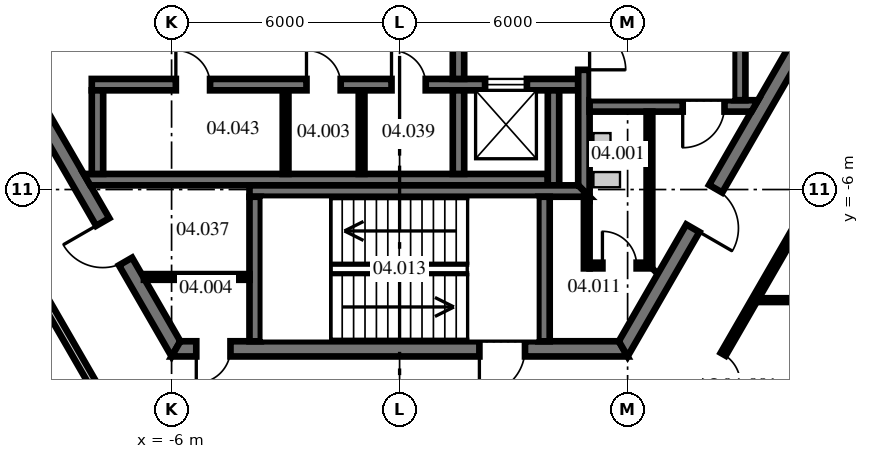
"""IFC4 building model, lengths in metres.
Left out: names, types, materials, properties, quantities, classifications, styles, units other than length and angle.
Written with IfcOpenShell. Run it as: python <this file> out.ifc"""

import sys

from ifc_helpers import new_model, si_unit, direction, frame, frame_2d, origin, place, context, subcontext, project, spatial, polyline, rectangle, outline, extrude, source, transform, mapped, element, fill, save


model = new_model("IFC4")
c1 = context("Model", 3, precision=1e-05, world=origin(), true_north=direction((0.0, 1.0)))
c2 = subcontext(c1, "Body", "Model", "MODEL_VIEW")
j1 = project(units=[si_unit("LENGTHUNIT", "METRE"), si_unit("PLANEANGLEUNIT", "RADIAN")], contexts=[c1])
p1 = place(None, origin())
s1 = spatial("IfcSite", under=j1, at=p1, CompositionType="ELEMENT")
p2 = place(p1, origin())
s2 = spatial("IfcBuilding", under=s1, at=p2, CompositionType="ELEMENT")
p3 = place(p2, frame((0.0, 0.0, 20.3)))
s3 = spatial("IfcBuildingStorey", under=s2, at=p3, CompositionType="ELEMENT", Elevation=20.3)
m1 = source(origin(), c2, "Body", "SweptSolid", [
    extrude(outline(polyline([(-0.115, -0.2), (11.885, -0.2), (11.654, 0.2), (0.115, 0.2), (-0.115, -0.2)])), origin(), (0.0, 0.0, 1.0), 4.1),
])
p4 = place(p3, frame((-11.769, 0.0, 0.0), z_axis=(0.0, 0.0, 1.0), x_axis=(0.499996592174, -0.866027371285, 0.0)))
e1 = element("IfcWall", 1, at=p4, inside=s3, PredefinedType="SHEAR", context=c2, shape_type="MappedRepresentation", body=[
    mapped(m1, transform((0.0, 0.0, 0.0), scale=1.0)),
])
p5 = place(p4, frame((1.405, 0.0, 0.0)))
e2 = element("IfcOpeningElement", 2, at=p5, cuts=e1, PredefinedType="OPENING", context=c2, shape_type="SweptSolid", body=[
    extrude(rectangle(XDim=1.8, YDim=2.1, at=frame_2d((0.9, 1.05))), frame((0.0, 0.21, 0.0), z_axis=(0.0, -1.0, 0.0), x_axis=(1.0, 0.0, 0.0)), (0.0, 0.0, 1.0), 0.42),
])
p6 = place(p4, frame((7.915, 0.0, 0.0)))
e3 = element("IfcOpeningElement", 3, at=p6, cuts=e1, PredefinedType="OPENING", context=c2, shape_type="SweptSolid", body=[
    extrude(rectangle(XDim=1.2, YDim=2.1, at=frame_2d((0.6, 1.05))), frame((0.0, 0.21, 0.0), z_axis=(0.0, -1.0, 0.0), x_axis=(1.0, 0.0, 0.0)), (0.0, 0.0, 1.0), 0.42),
])
p7 = place(p3, frame((-5.885, -10.192, 0.0), z_axis=(0.0, 0.0, 1.0), x_axis=(1.0, 0.0, 0.0)))
e4 = element("IfcWall", 4, at=p7, inside=s3, PredefinedType="SHEAR", context=c2, shape_type="MappedRepresentation", body=[
    mapped(m1, transform((0.0, 0.0, 0.0), scale=1.0)),
])
p8 = place(p7, frame((7.985, 0.0, 0.0)))
e5 = element("IfcOpeningElement", 5, at=p8, cuts=e4, PredefinedType="OPENING", context=c2, shape_type="SweptSolid", body=[
    extrude(rectangle(XDim=1.2, YDim=2.1, at=frame_2d((0.6, 1.05))), frame((0.0, 0.21, 0.0), z_axis=(0.0, -1.0, 0.0), x_axis=(1.0, 0.0, 0.0)), (0.0, 0.0, 1.0), 0.42),
])
p9 = place(p7, frame((0.534, 0.0, 0.0)))
e6 = element("IfcOpeningElement", 6, at=p9, cuts=e4, PredefinedType="OPENING", context=c2, shape_type="SweptSolid", body=[
    extrude(rectangle(XDim=0.9, YDim=2.1, at=frame_2d((0.45, 1.05))), frame((0.0, 0.21, 0.0), z_axis=(0.0, -1.0, 0.0), x_axis=(1.0, 0.0, 0.0)), (0.0, 0.0, 1.0), 0.42),
])
p10 = place(p3, frame((5.885, -10.192, 0.0), z_axis=(0.0, 0.0, 1.0), x_axis=(0.499996592174, 0.866027371285, 0.0)))
e7 = element("IfcWall", 7, at=p10, inside=s3, PredefinedType="SHEAR", context=c2, shape_type="MappedRepresentation", body=[
    mapped(m1, transform((0.0, 0.0, 0.0), scale=1.0)),
])
p11 = place(p10, frame((3.665, 0.0, 0.0)))
e8 = element("IfcOpeningElement", 8, at=p11, cuts=e7, PredefinedType="OPENING", context=c2, shape_type="SweptSolid", body=[
    extrude(rectangle(XDim=1.2, YDim=2.1, at=frame_2d((0.6, 1.05))), frame((0.0, 0.21, 0.0), z_axis=(0.0, -1.0, 0.0), x_axis=(1.0, 0.0, 0.0)), (0.0, 0.0, 1.0), 0.42),
])
m2 = source(origin(), c2, "Body", "SweptSolid", [
    extrude(rectangle(XDim=12.8, YDim=0.3, at=frame_2d((6.4, 0.0))), origin(), (0.0, 0.0, 1.0), 4.1),
])
p12 = place(p3, frame((-8.1, -3.24, 0.0), z_axis=(0.0, 0.0, 1.0), x_axis=(1.0, 0.0, 0.0)))
e9 = element("IfcWall", 9, at=p12, inside=s3, PredefinedType="SHEAR", context=c2, shape_type="MappedRepresentation", body=[
    mapped(m2, transform((0.0, 0.0, 0.0), scale=1.0)),
])
p13 = place(p12, frame((2.212, 0.0, 0.0)))
e10 = element("IfcOpeningElement", 10, at=p13, cuts=e9, PredefinedType="OPENING", context=c2, shape_type="SweptSolid", body=[
    extrude(rectangle(XDim=0.9, YDim=2.1, at=frame_2d((0.45, 1.05))), frame((0.0, 0.16, 0.0), z_axis=(0.0, -1.0, 0.0), x_axis=(1.0, 0.0, 0.0)), (0.0, 0.0, 1.0), 0.32),
])
p14 = place(p12, frame((5.65, 0.0, 0.0)))
e11 = element("IfcOpeningElement", 11, at=p14, cuts=e9, PredefinedType="OPENING", context=c2, shape_type="SweptSolid", body=[
    extrude(rectangle(XDim=0.9, YDim=2.1, at=frame_2d((0.45, 1.05))), frame((0.0, 0.16, 0.0), z_axis=(0.0, -1.0, 0.0), x_axis=(1.0, 0.0, 0.0)), (0.0, 0.0, 1.0), 0.32),
])
p15 = place(p12, frame((7.887, 0.0, 0.0)))
e12 = element("IfcOpeningElement", 12, at=p15, cuts=e9, PredefinedType="OPENING", context=c2, shape_type="SweptSolid", body=[
    extrude(rectangle(XDim=0.9, YDim=2.1, at=frame_2d((0.45, 1.05))), frame((0.0, 0.16, 0.0), z_axis=(0.0, -1.0, 0.0), x_axis=(1.0, 0.0, 0.0)), (0.0, 0.0, 1.0), 0.32),
])
p16 = place(p12, frame((10.35, 0.0, 0.0)))
e13 = element("IfcOpeningElement", 13, at=p16, cuts=e9, PredefinedType="OPENING", context=c2, shape_type="SweptSolid", body=[
    extrude(rectangle(XDim=1.1, YDim=2.1, at=frame_2d((0.55, 1.05))), frame((0.0, 0.16, 0.0), z_axis=(0.0, -1.0, 0.0), x_axis=(1.0, 0.0, 0.0)), (0.0, 0.0, 1.0), 0.32),
])
m3 = source(origin(), c2, "Body", "SweptSolid", [
    extrude(outline(polyline([(12.0, -0.15), (-0.04, -0.15), (-0.213, 0.15), (12.0, 0.15), (12.0, -0.15)])), origin(), (0.0, 0.0, 1.0), 4.1),
])
p17 = place(p3, frame((-8.1, -5.74, 0.0), z_axis=(0.0, 0.0, 1.0), x_axis=(1.0, 0.0, 0.0)))
e14 = element("IfcWall", 14, at=p17, inside=s3, PredefinedType="SHEAR", context=c2, shape_type="MappedRepresentation", body=[
    mapped(m3, transform((0.0, 0.0, 0.0), scale=1.0)),
])
m4 = source(origin(), c2, "Body", "SweptSolid", [
    extrude(rectangle(XDim=2.2, YDim=0.3, at=frame_2d((1.1, 0.0))), origin(), (0.0, 0.0, 1.0), 4.1),
])
for number, where, z_axis, x_axis in (
    (15, (-7.95, -5.59, 0.0), (0.0, 0.0, 1.0), (0.0, 1.0, 0.0)),
    (16, (1.55, -5.59, 0.0), (0.0, 0.0, 1.0), (0.0, 1.0, 0.0)),
):
    element("IfcWall", number, at=place(p3, frame(where, z_axis=z_axis, x_axis=x_axis)), inside=s3, PredefinedType="SHEAR", context=c2, shape_type="MappedRepresentation", body=[
        mapped(m4, transform((0.0, 0.0, 0.0), scale=1.0)),
    ])
m5 = source(origin(), c2, "Body", "SweptSolid", [
    extrude(rectangle(XDim=2.5, YDim=0.3, at=frame_2d((1.25, 0.0))), origin(), (0.0, 0.0, 1.0), 4.1),
])
p18 = place(p3, frame((4.05, -5.89, 0.0), z_axis=(0.0, 0.0, 1.0), x_axis=(0.0, 1.0, 0.0)))
e17 = element("IfcWall", 17, at=p18, inside=s3, PredefinedType="SHEAR", context=c2, shape_type="MappedRepresentation", body=[
    mapped(m5, transform((0.0, 0.0, 0.0), scale=1.0)),
])
m6 = source(origin(), c2, "Body", "SweptSolid", [
    extrude(rectangle(XDim=3.0, YDim=0.3, at=frame_2d((1.5, 0.0))), origin(), (0.0, 0.0, 1.0), 4.1),
])
p19 = place(p3, frame((1.55, -3.09, 0.0), z_axis=(0.0, 0.0, 1.0), x_axis=(0.0, 1.0, 0.0)))
e18 = element("IfcWall", 18, at=p19, inside=s3, PredefinedType="SHEAR", context=c2, shape_type="MappedRepresentation", body=[
    mapped(m6, transform((0.0, 0.0, 0.0), scale=1.0)),
])
p20 = place(p19, frame((0.9, 0.0, 0.0)))
e19 = element("IfcOpeningElement", 19, at=p20, cuts=e18, PredefinedType="OPENING", context=c2, shape_type="SweptSolid", body=[
    extrude(rectangle(XDim=1.2, YDim=2.1, at=frame_2d((0.6, 1.05))), frame((0.0, 0.16, 0.0), z_axis=(0.0, -1.0, 0.0), x_axis=(1.0, 0.0, 0.0)), (0.0, 0.0, 1.0), 0.32),
])
m7 = source(origin(), c2, "Body", "SweptSolid", [
    extrude(outline(polyline([(-0.15, -0.15), (9.99, -0.15), (9.99, 0.15), (0.15, 0.15), (-0.15, -0.15)])), origin(), (0.0, 0.0, 1.0), 4.1),
])
p21 = place(p3, frame((4.85, -6.04, 0.0), z_axis=(0.0, 0.0, 1.0), x_axis=(0.0, 1.0, 0.0)))
e20 = element("IfcWall", 20, at=p21, inside=s3, PredefinedType="SHEAR", context=c2, shape_type="MappedRepresentation", body=[
    mapped(m7, transform((0.0, 0.0, 0.0), scale=1.0)),
])
p22 = place(p21, frame((3.19, 0.0, 0.0)))
e21 = element("IfcOpeningElement", 21, at=p22, cuts=e20, PredefinedType="OPENING", context=c2, shape_type="SweptSolid", body=[
    extrude(rectangle(XDim=1.1, YDim=2.1, at=frame_2d((0.55, 1.05))), frame((0.0, 0.16, 0.0), z_axis=(0.0, -1.0, 0.0), x_axis=(1.0, 0.0, 0.0)), (0.0, 0.0, 1.0), 0.32),
])
m8 = source(origin(), c2, "Body", "SweptSolid", [
    extrude(outline(polyline([(0.0, -0.15), (0.0, 0.15), (4.433, 0.15), (4.26, -0.15), (0.0, -0.15)])), origin(), (0.0, 0.0, 1.0), 4.1),
])
p23 = place(p3, frame((5.0, -3.8, 0.0), z_axis=(0.0, 0.0, 1.0), x_axis=(1.0, 0.0, 0.0)))
e22 = element("IfcWall", 22, at=p23, inside=s3, PredefinedType="SHEAR", context=c2, shape_type="MappedRepresentation", body=[
    mapped(m8, transform((0.0, 0.0, 0.0), scale=1.0)),
])
p24 = place(p23, frame((2.45, 0.0, 0.0)))
e23 = element("IfcOpeningElement", 23, at=p24, cuts=e22, PredefinedType="OPENING", context=c2, shape_type="SweptSolid", body=[
    extrude(rectangle(XDim=1.1, YDim=2.1, at=frame_2d((0.55, 1.05))), frame((0.0, 0.16, 0.0), z_axis=(0.0, -1.0, 0.0), x_axis=(1.0, 0.0, 0.0)), (0.0, 0.0, 1.0), 0.32),
])
m9 = source(origin(), c2, "Body", "SweptSolid", [
    extrude(rectangle(XDim=7.3, YDim=0.3, at=frame_2d((3.65, 0.0))), origin(), (0.0, 0.0, 1.0), 4.1),
])
p25 = place(p3, frame((8.95, -3.65, 0.0), z_axis=(0.0, 0.0, 1.0), x_axis=(0.0, 1.0, 0.0)))
e24 = element("IfcWall", 24, at=p25, inside=s3, PredefinedType="SHEAR", context=c2, shape_type="MappedRepresentation", body=[
    mapped(m9, transform((0.0, 0.0, 0.0), scale=1.0)),
])
m10 = source(origin(), c2, "Body", "SweptSolid", [
    extrude(outline(polyline([(0.0, -0.15), (8.95, -0.15), (8.65, 0.15), (0.0, 0.15), (0.0, -0.15)])), origin(), (0.0, 0.0, 1.0), 4.1),
])
p26 = place(p3, frame((-3.95, -6.04, 0.0), z_axis=(0.0, 0.0, 1.0), x_axis=(1.0, 0.0, 0.0)))
e25 = element("IfcWall", 25, at=p26, inside=s3, PredefinedType="SHEAR", context=c2, shape_type="MappedRepresentation", body=[
    mapped(m10, transform((0.0, 0.0, 0.0), scale=1.0)),
])
m11 = source(origin(), c2, "Body", "SweptSolid", [
    extrude(outline(polyline([(3.8, -0.15), (-0.004, -0.15), (-0.004, 0.15), (3.8, 0.15), (3.8, -0.15)])), origin(), (0.0, 0.0, 1.0), 4.1),
])
for number, where, z_axis, x_axis in (
    (26, (-3.8, -9.99, 0.0), (0.0, 0.0, 1.0), (0.0, 1.0, 0.0)),
    (27, (3.8, -9.99, 0.0), (0.0, 0.0, 1.0), (0.0, 1.0, 0.0)),
):
    element("IfcWall", number, at=place(p3, frame(where, z_axis=z_axis, x_axis=x_axis)), inside=s3, PredefinedType="SHEAR", context=c2, shape_type="MappedRepresentation", body=[
        mapped(m11, transform((0.0, 0.0, 0.0), scale=1.0)),
    ])
m12 = source(origin(), c2, "Body", "SweptSolid", [
    extrude(rectangle(XDim=2.2, YDim=0.15, at=frame_2d((1.1, 0.0))), origin(), (0.0, 0.0, 1.0), 4.1),
])
for number, where, z_axis, x_axis in (
    (28, (-3.0, -5.59, 0.0), (0.0, 0.0, 1.0), (0.0, 1.0, 0.0)),
    (29, (-1.0, -5.59, 0.0), (0.0, 0.0, 1.0), (0.0, 1.0, 0.0)),
):
    element("IfcWall", number, at=place(p3, frame(where, z_axis=z_axis, x_axis=x_axis)), inside=s3, PredefinedType="PARTITIONING", context=c2, shape_type="MappedRepresentation", body=[
        mapped(m12, transform((0.0, 0.0, 0.0), scale=1.0)),
    ])
m13 = source(origin(), c2, "Body", "SweptSolid", [
    extrude(rectangle(XDim=2.777, YDim=0.15, at=frame_2d((1.389, 0.0))), origin(), (0.0, 0.0, 1.0), 4.1),
])
p27 = place(p3, frame((-6.727, -8.3, 0.0), z_axis=(0.0, 0.0, 1.0), x_axis=(1.0, 0.0, 0.0)))
e30 = element("IfcWall", 30, at=p27, inside=s3, PredefinedType="PARTITIONING", context=c2, shape_type="MappedRepresentation", body=[
    mapped(m13, transform((0.0, 0.0, 0.0), scale=1.0)),
])
m14 = source(origin(), c2, "Body", "SweptSolid", [
    extrude(outline(polyline([(0.0, -0.075), (1.65, -0.075), (1.5, 0.075), (0.0, 0.075), (0.0, -0.075)])), origin(), (0.0, 0.0, 1.0), 4.1),
])
p28 = place(p3, frame((5.0, -8.0, 0.0), z_axis=(0.0, 0.0, 1.0), x_axis=(1.0, 0.0, 0.0)))
e31 = element("IfcWall", 31, at=p28, inside=s3, PredefinedType="PARTITIONING", context=c2, shape_type="MappedRepresentation", body=[
    mapped(m14, transform((0.0, 0.0, 0.0), scale=1.0)),
])
p29 = place(p28, frame((0.337, 0.0, 0.0)))
e32 = element("IfcOpeningElement", 32, at=p29, cuts=e31, PredefinedType="OPENING", context=c2, shape_type="SweptSolid", body=[
    extrude(rectangle(XDim=0.9, YDim=2.1, at=frame_2d((0.45, 1.05))), frame((0.0, 0.085, 0.0), z_axis=(0.0, -1.0, 0.0), x_axis=(1.0, 0.0, 0.0)), (0.0, 0.0, 1.0), 0.17),
])
m15 = source(origin(), c2, "Body", "SweptSolid", [
    extrude(outline(polyline([(-0.075, -0.075), (4.05, -0.075), (4.05, 0.075), (0.075, 0.075), (-0.075, -0.075)])), origin(), (0.0, 0.0, 1.0), 4.1),
])
p30 = place(p3, frame((6.575, -8.0, 0.0), z_axis=(0.0, 0.0, 1.0), x_axis=(0.0, 1.0, 0.0)))
e33 = element("IfcWall", 33, at=p30, inside=s3, PredefinedType="PARTITIONING", context=c2, shape_type="MappedRepresentation", body=[
    mapped(m15, transform((0.0, 0.0, 0.0), scale=1.0)),
])
m16 = source(origin(), c2, "Body", "SweptSolid", [
    extrude(rectangle(XDim=1.885, YDim=0.15, at=frame_2d((0.942, 0.0))), origin(), (0.0, 0.0, 1.0), 4.1),
])
p31 = place(p3, frame((4.925, -8.075, 0.0), z_axis=(0.0, 0.0, 1.0), x_axis=(0.0, 1.0, 0.0)))
e34 = element("IfcWall", 34, at=p31, inside=s3, PredefinedType="PARTITIONING", context=c2, shape_type="MappedRepresentation", body=[
    mapped(m16, transform((0.0, 0.0, 0.0), scale=1.0)),
])
m17 = source(origin(), c2, "Body", "SweptSolid", [
    extrude(rectangle(XDim=8.229, YDim=0.2, at=frame_2d((4.115, 0.0))), origin(), (0.0, 0.0, 1.0), 4.1),
])
p32 = place(p3, frame((-11.356, -5.416, 0.0), z_axis=(0.0, 0.0, 1.0), x_axis=(0.500012644715, -0.866018103232, 0.0)))
e35 = element("IfcWall", 35, at=p32, inside=s3, PredefinedType="PARTITIONING", context=c2, shape_type="MappedRepresentation", body=[
    mapped(m17, transform((0.0, 0.0, 0.0), scale=1.0)),
])
m18 = source(origin(), c2, "Body", "SweptSolid", [
    extrude(rectangle(XDim=12.148, YDim=0.1, at=frame_2d((6.074, 0.0))), origin(), (0.0, 0.0, 1.0), 3.343),
])
p33 = place(p3, frame((9.338, -8.91, 0.0), z_axis=(0.0, 0.0, 1.0), x_axis=(1.0, 0.0, 0.0)))
e36 = element("IfcWall", 36, at=p33, inside=s3, PredefinedType="PARTITIONING", context=c2, shape_type="MappedRepresentation", body=[
    mapped(m18, transform((0.0, 0.0, 0.0), scale=1.0)),
])
m19 = source(origin(), c2, "Body", "SweptSolid", [
    extrude(rectangle(XDim=8.219, YDim=0.15, at=frame_2d((4.11, 0.0))), origin(), (0.0, 0.0, 1.0), 4.1),
])
p34 = place(p3, frame((7.256, -12.516, 0.0), z_axis=(0.0, 0.0, 1.0), x_axis=(0.499994999852, 0.866028290602, 0.0)))
e37 = element("IfcWall", 37, at=p34, inside=s3, PredefinedType="PARTITIONING", context=c2, shape_type="MappedRepresentation", body=[
    mapped(m19, transform((0.0, 0.0, 0.0), scale=1.0)),
])
p35 = place(p34, frame((1.62, 0.0, 0.0)))
e38 = element("IfcOpeningElement", 38, at=p35, cuts=e37, PredefinedType="OPENING", context=c2, shape_type="SweptSolid", body=[
    extrude(rectangle(XDim=0.9, YDim=2.1, at=frame_2d((0.45, 1.05))), frame((0.0, 0.085, 0.0), z_axis=(0.0, -1.0, 0.0), x_axis=(1.0, 0.0, 0.0)), (0.0, 0.0, 1.0), 0.17),
])
p36 = place(p8, frame((1.2, 0.0, 0.0), z_axis=(0.0, 0.0, 1.0), x_axis=(-1.0, 0.0, 0.0)))
e39 = element("IfcDoor", 39, at=p36, inside=s3, OperationType="SINGLE_SWING_RIGHT", PredefinedType="DOOR", context=c2, shape_type="SweptSolid", body=[
    extrude(rectangle(XDim=1.2, YDim=2.1, at=frame_2d((0.6, 1.05))), frame((0.0, 0.025, 0.0), z_axis=(0.0, -1.0, 0.0), x_axis=(1.0, 0.0, 0.0)), (0.0, 0.0, 1.0), 0.05),
])
fill(e5, e39)
p37 = place(p11, frame((1.2, 0.0, 0.0), z_axis=(0.0, 0.0, 1.0), x_axis=(-1.0, 0.0, 0.0)))
e40 = element("IfcDoor", 40, at=p37, inside=s3, OperationType="SINGLE_SWING_RIGHT", PredefinedType="DOOR", context=c2, shape_type="SweptSolid", body=[
    extrude(rectangle(XDim=1.2, YDim=2.1, at=frame_2d((0.6, 1.05))), frame((0.0, 0.025, 0.0), z_axis=(0.0, -1.0, 0.0), x_axis=(1.0, 0.0, 0.0)), (0.0, 0.0, 1.0), 0.05),
])
fill(e8, e40)
p38 = place(p22, frame((1.1, 0.0, 0.0), z_axis=(0.0, 0.0, 1.0), x_axis=(-1.0, 0.0, 0.0)))
e41 = element("IfcDoor", 41, at=p38, inside=s3, OperationType="SINGLE_SWING_RIGHT", PredefinedType="DOOR", context=c2, shape_type="SweptSolid", body=[
    extrude(rectangle(XDim=1.1, YDim=2.1, at=frame_2d((0.55, 1.05))), frame((0.0, 0.025, 0.0), z_axis=(0.0, -1.0, 0.0), x_axis=(1.0, 0.0, 0.0)), (0.0, 0.0, 1.0), 0.05),
])
fill(e21, e41)
p39 = place(p24, frame((1.1, 0.0, 0.0), z_axis=(0.0, 0.0, 1.0), x_axis=(-1.0, 0.0, 0.0)))
e42 = element("IfcDoor", 42, at=p39, inside=s3, OperationType="SINGLE_SWING_RIGHT", PredefinedType="DOOR", context=c2, shape_type="SweptSolid", body=[
    extrude(rectangle(XDim=1.1, YDim=2.1, at=frame_2d((0.55, 1.05))), frame((0.0, 0.025, 0.0), z_axis=(0.0, -1.0, 0.0), x_axis=(1.0, 0.0, 0.0)), (0.0, 0.0, 1.0), 0.05),
])
fill(e23, e42)
p40 = place(p13, origin())
e43 = element("IfcDoor", 43, at=p40, inside=s3, OperationType="SINGLE_SWING_LEFT", PredefinedType="DOOR", context=c2, shape_type="SweptSolid", body=[
    extrude(rectangle(XDim=0.9, YDim=2.1, at=frame_2d((0.45, 1.05))), frame((0.0, 0.025, 0.0), z_axis=(0.0, -1.0, 0.0), x_axis=(1.0, 0.0, 0.0)), (0.0, 0.0, 1.0), 0.05),
])
fill(e10, e43)
p41 = place(p14, origin())
e44 = element("IfcDoor", 44, at=p41, inside=s3, OperationType="SINGLE_SWING_LEFT", PredefinedType="DOOR", context=c2, shape_type="SweptSolid", body=[
    extrude(rectangle(XDim=0.9, YDim=2.1, at=frame_2d((0.45, 1.05))), frame((0.0, 0.025, 0.0), z_axis=(0.0, -1.0, 0.0), x_axis=(1.0, 0.0, 0.0)), (0.0, 0.0, 1.0), 0.05),
])
fill(e11, e44)
p42 = place(p15, origin())
e45 = element("IfcDoor", 45, at=p42, inside=s3, OperationType="SINGLE_SWING_LEFT", PredefinedType="DOOR", context=c2, shape_type="SweptSolid", body=[
    extrude(rectangle(XDim=0.9, YDim=2.1, at=frame_2d((0.45, 1.05))), frame((0.0, 0.025, 0.0), z_axis=(0.0, -1.0, 0.0), x_axis=(1.0, 0.0, 0.0)), (0.0, 0.0, 1.0), 0.05),
])
fill(e12, e45)
p43 = place(p6, frame((1.2, 0.0, 0.0), z_axis=(0.0, 0.0, 1.0), x_axis=(-1.0, 0.0, 0.0)))
e46 = element("IfcDoor", 46, at=p43, inside=s3, OperationType="SINGLE_SWING_RIGHT", PredefinedType="DOOR", context=c2, shape_type="SweptSolid", body=[
    extrude(rectangle(XDim=1.2, YDim=2.1, at=frame_2d((0.6, 1.05))), frame((0.0, 0.025, 0.0), z_axis=(0.0, -1.0, 0.0), x_axis=(1.0, 0.0, 0.0)), (0.0, 0.0, 1.0), 0.05),
])
fill(e3, e46)
p44 = place(p9, frame((0.9, 0.0, 0.0), z_axis=(0.0, 0.0, 1.0), x_axis=(-1.0, 0.0, 0.0)))
e47 = element("IfcDoor", 47, at=p44, inside=s3, OperationType="SINGLE_SWING_RIGHT", PredefinedType="DOOR", context=c2, shape_type="SweptSolid", body=[
    extrude(rectangle(XDim=0.9, YDim=2.1, at=frame_2d((0.45, 1.05))), frame((0.0, 0.025, 0.0), z_axis=(0.0, -1.0, 0.0), x_axis=(1.0, 0.0, 0.0)), (0.0, 0.0, 1.0), 0.05),
])
fill(e6, e47)
p45 = place(p29, origin())
e48 = element("IfcDoor", 48, at=p45, inside=s3, OperationType="SINGLE_SWING_LEFT", PredefinedType="DOOR", context=c2, shape_type="SweptSolid", body=[
    extrude(rectangle(XDim=0.9, YDim=2.1, at=frame_2d((0.45, 1.05))), frame((0.0, 0.025, 0.0), z_axis=(0.0, -1.0, 0.0), x_axis=(1.0, 0.0, 0.0)), (0.0, 0.0, 1.0), 0.05),
])
fill(e32, e48)
p46 = place(p16, origin())
e49 = element("IfcDoor", 49, at=p46, inside=s3, OperationType="DOUBLE_DOOR_SLIDING", PredefinedType="DOOR", context=c2, shape_type="SweptSolid", body=[
    extrude(rectangle(XDim=1.1, YDim=2.1, at=frame_2d((0.55, 1.05))), frame((0.0, 0.025, 0.0), z_axis=(0.0, -1.0, 0.0), x_axis=(1.0, 0.0, 0.0)), (0.0, 0.0, 1.0), 0.05),
])
fill(e13, e49)
p47 = place(p35, origin())
e50 = element("IfcDoor", 50, at=p47, inside=s3, OperationType="SINGLE_SWING_RIGHT", PredefinedType="DOOR", context=c2, shape_type="SweptSolid", body=[
    extrude(rectangle(XDim=0.9, YDim=2.1, at=frame_2d((0.45, 1.05))), frame((0.0, 0.025, 0.0), z_axis=(0.0, -1.0, 0.0), x_axis=(1.0, 0.0, 0.0)), (0.0, 0.0, 1.0), 0.05),
])
fill(e38, e50)
save(model, sys.argv[1])
